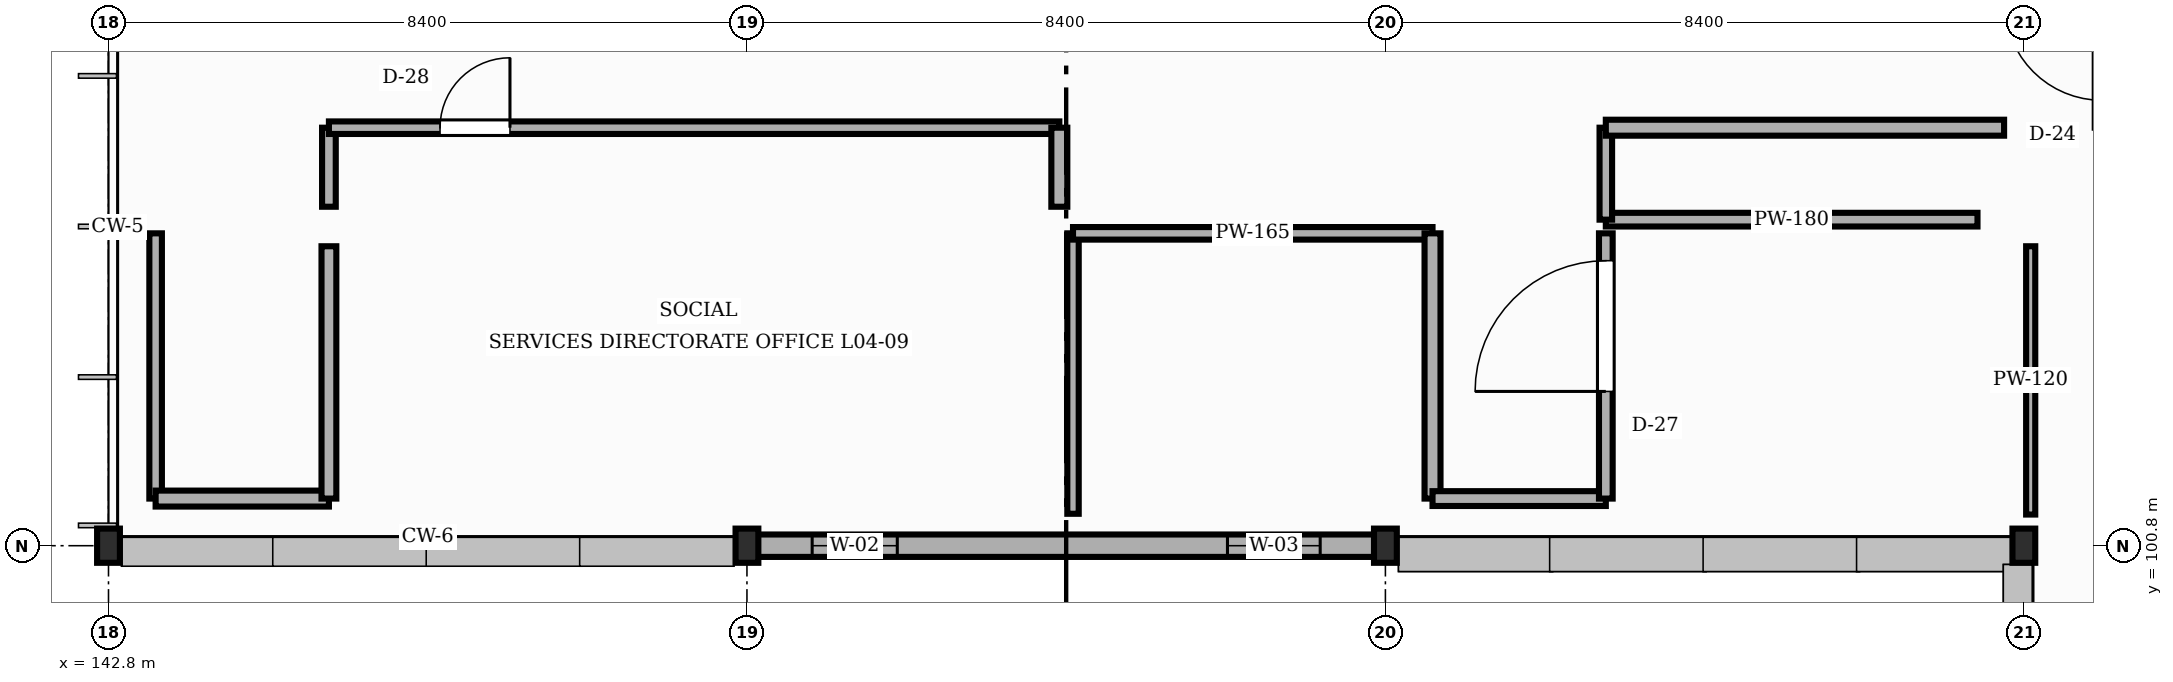
"""IFC4 building model, lengths in metres.
Left out: names, types, materials, properties, quantities, classifications, styles, units other than length and angle.
Written with IfcOpenShell. Run it as: python <this file> out.ifc"""

import sys

from ifc_helpers import new_model, si_unit, direction, frame, frame_2d, origin, origin_2d, place, context, subcontext, project, spatial, rectangle, i_section, extrude, element, fill, save


model = new_model("IFC4")
c1 = context("Model", 3, precision=1e-05, world=origin(), true_north=direction((0.0, 1.0)))
c2 = subcontext(c1, "Body", "Model", "MODEL_VIEW")
j1 = project(units=[si_unit("LENGTHUNIT", "METRE"), si_unit("PLANEANGLEUNIT", "RADIAN")], contexts=[c1])
p1 = place(None, origin())
s1 = spatial("IfcSite", under=j1, at=p1, CompositionType="ELEMENT")
p2 = place(p1, origin())
s2 = spatial("IfcBuilding", under=s1, at=p2, CompositionType="ELEMENT")
p3 = place(p2, frame((0.0, 0.0, 18.0)))
s3 = spatial("IfcBuildingStorey", under=s2, at=p3, CompositionType="ELEMENT", Elevation=18.0)
for number, where, z_axis, x_axis in (
    (1, (142.8, 100.8, 0.0), (0.0, 0.0, 1.0), (1.0, 0.0, 0.0)),
    (2, (151.2, 100.8, 0.0), (0.0, 0.0, 1.0), (1.0, 0.0, 0.0)),
    (3, (159.6, 100.8, 0.0), (0.0, 0.0, 1.0), (1.0, 0.0, 0.0)),
    (4, (168.0, 100.8, 0.0), (0.0, 0.0, 1.0), (1.0, 0.0, 0.0)),
):
    element("IfcColumn", number, at=place(p3, frame(where, z_axis=z_axis, x_axis=x_axis)), inside=s3, PredefinedType="COLUMN", context=c2, shape_type="SweptSolid", body=[
        extrude(i_section(OverallWidth=0.3, OverallDepth=0.45, WebThickness=0.014, FlangeThickness=0.026, FilletRadius=0.027, at=origin_2d()), origin(), (0.0, 0.0, 1.0), 4.05),
    ])
p4 = place(p3, frame((151.208, 100.8, 0.0), z_axis=(0.0, 0.0, 1.0), x_axis=(1.0, 0.0, 0.0)))
e5 = element("IfcWall", 5, at=p4, inside=s3, PredefinedType="STANDARD", context=c2, shape_type="SweptSolid", body=[
    extrude(rectangle(XDim=8.384, YDim=0.295, at=frame_2d((4.192, 0.0))), origin(), (0.0, 0.0, 1.0), 3.492),
])
p5 = place(p4, frame((0.85, 0.0, 0.9)))
e6 = element("IfcOpeningElement", 6, at=p5, cuts=e5, PredefinedType="OPENING", context=c2, shape_type="SweptSolid", body=[
    extrude(rectangle(XDim=1.12, YDim=1.05, at=frame_2d((0.56, 0.525))), frame((0.0, 0.157, 0.0), z_axis=(0.0, -1.0, 0.0), x_axis=(1.0, 0.0, 0.0)), (0.0, 0.0, 1.0), 0.315),
])
p6 = place(p4, frame((6.314, 0.0, 0.9)))
e7 = element("IfcOpeningElement", 7, at=p6, cuts=e5, PredefinedType="OPENING", context=c2, shape_type="SweptSolid", body=[
    extrude(rectangle(XDim=1.22, YDim=1.05, at=frame_2d((0.61, 0.525))), frame((0.0, 0.157, 0.0), z_axis=(0.0, -1.0, 0.0), x_axis=(1.0, 0.0, 0.0)), (0.0, 0.0, 1.0), 0.315),
])
p7 = place(p3, frame((168.09, 101.21, -0.004), z_axis=(0.0, 0.0, 1.0), x_axis=(0.0, 1.0, 0.0)))
e8 = element("IfcWall", 8, at=p7, inside=s3, PredefinedType="STANDARD", context=c2, shape_type="SweptSolid", body=[
    extrude(rectangle(XDim=3.53, YDim=0.12, at=frame_2d((1.765, 0.0))), origin(), (0.0, 0.0, 1.0), 3.506),
])
p8 = place(p3, frame((167.39, 105.09, -0.004), z_axis=(0.0, 0.0, 1.0), x_axis=(-1.0, 0.0, 0.0)))
e9 = element("IfcWall", 9, at=p8, inside=s3, PredefinedType="STANDARD", context=c2, shape_type="SweptSolid", body=[
    extrude(rectangle(XDim=4.89, YDim=0.18, at=frame_2d((2.445, 0.0))), origin(), (0.0, 0.0, 1.0), 3.854),
])
p9 = place(p3, frame((162.5, 105.09, -0.004), z_axis=(0.0, 0.0, 1.0), x_axis=(0.0, 1.0, 0.0)))
e10 = element("IfcWall", 10, at=p9, inside=s3, PredefinedType="STANDARD", context=c2, shape_type="SweptSolid", body=[
    extrude(rectangle(XDim=1.21, YDim=0.165, at=frame_2d((0.605, 0.0))), origin(), (0.0, 0.0, 1.0), 3.586),
])
p10 = place(p3, frame((162.5, 106.3, -0.004), z_axis=(0.0, 0.0, 1.0), x_axis=(1.0, 0.0, 0.0)))
e11 = element("IfcWall", 11, at=p10, inside=s3, PredefinedType="STANDARD", context=c2, shape_type="SweptSolid", body=[
    extrude(rectangle(XDim=5.24, YDim=0.21, at=frame_2d((2.62, 0.0))), origin(), (0.0, 0.0, 1.0), 3.854),
])
p11 = place(p3, frame((155.49, 101.22, -0.004), z_axis=(0.0, 0.0, 1.0), x_axis=(0.0, 1.0, 0.0)))
e12 = element("IfcWall", 12, at=p11, inside=s3, PredefinedType="STANDARD", context=c2, shape_type="SweptSolid", body=[
    extrude(rectangle(XDim=3.69, YDim=0.15, at=frame_2d((1.845, 0.0))), origin(), (0.0, 0.0, 1.0), 3.854),
])
p12 = place(p3, frame((155.49, 104.91, -0.004), z_axis=(0.0, 0.0, 1.0), x_axis=(1.0, 0.0, 0.0)))
e13 = element("IfcWall", 13, at=p12, inside=s3, PredefinedType="STANDARD", context=c2, shape_type="SweptSolid", body=[
    extrude(rectangle(XDim=4.73, YDim=0.165, at=frame_2d((2.365, 0.0))), origin(), (0.0, 0.0, 1.0), 3.854),
])
p13 = place(p3, frame((160.22, 104.91, -0.004), z_axis=(0.0, 0.0, 1.0), x_axis=(0.0, -1.0, 0.0)))
e14 = element("IfcWall", 14, at=p13, inside=s3, PredefinedType="STANDARD", context=c2, shape_type="SweptSolid", body=[
    extrude(rectangle(XDim=3.49, YDim=0.21, at=frame_2d((1.745, 0.0))), origin(), (0.0, 0.0, 1.0), 3.854),
])
p14 = place(p3, frame((160.22, 101.42, -0.004), z_axis=(0.0, 0.0, 1.0), x_axis=(1.0, 0.0, 0.0)))
e15 = element("IfcWall", 15, at=p14, inside=s3, PredefinedType="STANDARD", context=c2, shape_type="SweptSolid", body=[
    extrude(rectangle(XDim=2.28, YDim=0.195, at=frame_2d((1.14, 0.0))), origin(), (0.0, 0.0, 1.0), 3.854),
])
p15 = place(p3, frame((162.5, 101.42, -0.004), z_axis=(0.0, 0.0, 1.0), x_axis=(0.0, 1.0, 0.0)))
e16 = element("IfcWall", 16, at=p15, inside=s3, PredefinedType="STANDARD", context=c2, shape_type="SweptSolid", body=[
    extrude(rectangle(XDim=3.49, YDim=0.18, at=frame_2d((1.745, 0.0))), origin(), (0.0, 0.0, 1.0), 3.586),
])
p16 = place(p15, frame((1.41, 0.0, 0.0)))
e17 = element("IfcOpeningElement", 17, at=p16, cuts=e16, PredefinedType="OPENING", context=c2, shape_type="SweptSolid", body=[
    extrude(rectangle(XDim=1.72, YDim=2.22, at=frame_2d((0.86, 1.11))), frame((0.0, 0.1, 0.0), z_axis=(0.0, -1.0, 0.0), x_axis=(1.0, 0.0, 0.0)), (0.0, 0.0, 1.0), 0.2),
])
p17 = place(p3, frame((143.42, 104.91, -0.004), z_axis=(0.0, 0.0, 1.0), x_axis=(0.0, -1.0, 0.0)))
e18 = element("IfcWall", 18, at=p17, inside=s3, PredefinedType="STANDARD", context=c2, shape_type="SweptSolid", body=[
    extrude(rectangle(XDim=3.49, YDim=0.165, at=frame_2d((1.745, 0.0))), origin(), (0.0, 0.0, 1.0), 3.854),
])
p18 = place(p3, frame((143.42, 101.42, -0.004), z_axis=(0.0, 0.0, 1.0), x_axis=(1.0, 0.0, 0.0)))
e19 = element("IfcWall", 19, at=p18, inside=s3, PredefinedType="STANDARD", context=c2, shape_type="SweptSolid", body=[
    extrude(rectangle(XDim=2.28, YDim=0.21, at=frame_2d((1.14, 0.0))), origin(), (0.0, 0.0, 1.0), 3.854),
])
p19 = place(p3, frame((145.7, 101.42, -0.004), z_axis=(0.0, 0.0, 1.0), x_axis=(0.0, 1.0, 0.0)))
e20 = element("IfcWall", 20, at=p19, inside=s3, PredefinedType="STANDARD", context=c2, shape_type="SweptSolid", body=[
    extrude(rectangle(XDim=3.32, YDim=0.195, at=frame_2d((1.66, 0.0))), origin(), (0.0, 0.0, 1.0), 3.636),
])
p20 = place(p3, frame((145.7, 105.26, -0.004), z_axis=(0.0, 0.0, 1.0), x_axis=(0.0, 1.0, 0.0)))
e21 = element("IfcWall", 21, at=p20, inside=s3, PredefinedType="STANDARD", context=c2, shape_type="SweptSolid", body=[
    extrude(rectangle(XDim=1.04, YDim=0.18, at=frame_2d((0.52, 0.0))), origin(), (0.0, 0.0, 1.0), 3.636),
])
p21 = place(p3, frame((145.7, 106.3, -0.004), z_axis=(0.0, 0.0, 1.0), x_axis=(1.0, 0.0, 0.0)))
e22 = element("IfcWall", 22, at=p21, inside=s3, PredefinedType="STANDARD", context=c2, shape_type="SweptSolid", body=[
    extrude(rectangle(XDim=9.61, YDim=0.165, at=frame_2d((4.805, 0.0))), origin(), (0.0, 0.0, 1.0), 3.854),
])
p22 = place(p21, frame((1.462, 0.0, 0.0)))
e23 = element("IfcOpeningElement", 23, at=p22, cuts=e22, PredefinedType="OPENING", context=c2, shape_type="SweptSolid", body=[
    extrude(rectangle(XDim=0.92, YDim=2.3, at=frame_2d((0.46, 1.15))), frame((0.0, 0.093, 0.0), z_axis=(0.0, -1.0, 0.0), x_axis=(1.0, 0.0, 0.0)), (0.0, 0.0, 1.0), 0.185),
])
p23 = place(p3, frame((155.31, 106.3, -0.004), z_axis=(0.0, 0.0, 1.0), x_axis=(0.0, -1.0, 0.0)))
e24 = element("IfcWall", 24, at=p23, inside=s3, PredefinedType="STANDARD", context=c2, shape_type="SweptSolid", body=[
    extrude(rectangle(XDim=1.04, YDim=0.21, at=frame_2d((0.52, 0.0))), origin(), (0.0, 0.0, 1.0), 3.854),
])
p24 = place(p5, origin())
e25 = element("IfcWindow", 25, at=p24, inside=s3, PartitioningType="SINGLE_PANEL", PredefinedType="WINDOW", context=c2, shape_type="SweptSolid", body=[
    extrude(rectangle(XDim=1.12, YDim=1.05, at=frame_2d((0.56, 0.525))), frame((0.0, 0.03, 0.0), z_axis=(0.0, -1.0, 0.0), x_axis=(1.0, 0.0, 0.0)), (0.0, 0.0, 1.0), 0.06),
])
fill(e6, e25)
p25 = place(p6, origin())
e26 = element("IfcWindow", 26, at=p25, inside=s3, PartitioningType="SINGLE_PANEL", PredefinedType="WINDOW", context=c2, shape_type="SweptSolid", body=[
    extrude(rectangle(XDim=1.22, YDim=1.05, at=frame_2d((0.61, 0.525))), frame((0.0, 0.03, 0.0), z_axis=(0.0, -1.0, 0.0), x_axis=(1.0, 0.0, 0.0)), (0.0, 0.0, 1.0), 0.06),
])
fill(e7, e26)
p26 = place(p16, origin())
e27 = element("IfcDoor", 27, at=p26, inside=s3, OperationType="SINGLE_SWING_LEFT", PredefinedType="DOOR", context=c2, shape_type="SweptSolid", body=[
    extrude(rectangle(XDim=1.72, YDim=2.22, at=frame_2d((0.86, 1.11))), frame((0.0, 0.025, 0.0), z_axis=(0.0, -1.0, 0.0), x_axis=(1.0, 0.0, 0.0)), (0.0, 0.0, 1.0), 0.05),
])
fill(e17, e27)
p27 = place(p22, origin())
e28 = element("IfcDoor", 28, at=p27, inside=s3, OperationType="SINGLE_SWING_RIGHT", PredefinedType="DOOR", context=c2, shape_type="SweptSolid", body=[
    extrude(rectangle(XDim=0.92, YDim=2.3, at=frame_2d((0.46, 1.15))), frame((0.0, 0.025, 0.0), z_axis=(0.0, -1.0, 0.0), x_axis=(1.0, 0.0, 0.0)), (0.0, 0.0, 1.0), 0.05),
])
fill(e23, e28)
save(model, sys.argv[1])
